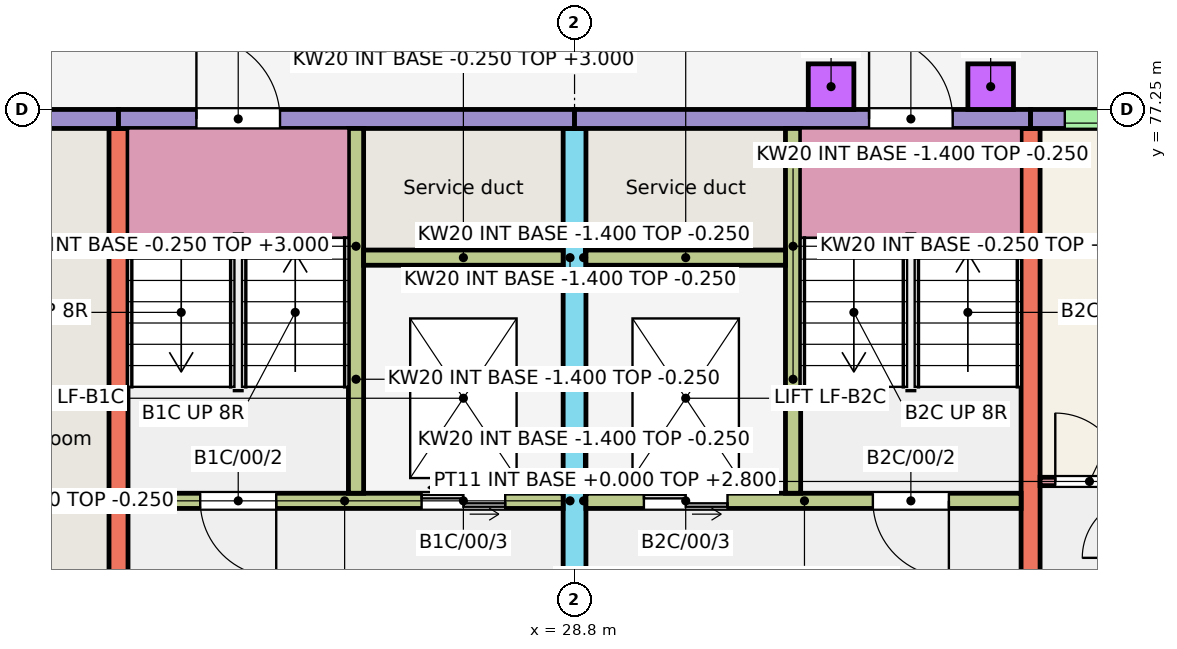
"""IFC4 building model, lengths in metres.
Left out: names, types, materials, properties, quantities, classifications, styles, units other than length and angle.
Written with IfcOpenShell. Run it as: python <this file> out.ifc"""

import sys

from ifc_helpers import new_model, si_unit, direction, frame, frame_2d, origin, origin_2d, place, context, subcontext, project, spatial, rectangle, extrude, element, fill, save


model = new_model("IFC4")
c1 = context("Model", 3, precision=1e-05, world=origin(), true_north=direction((0.0, 1.0)))
c2 = subcontext(c1, "Body", "Model", "MODEL_VIEW")
j1 = project(units=[si_unit("LENGTHUNIT", "METRE"), si_unit("PLANEANGLEUNIT", "RADIAN")], contexts=[c1])
p1 = place(None, origin())
s1 = spatial("IfcSite", under=j1, at=p1, CompositionType="ELEMENT")
p2 = place(p1, origin())
s2 = spatial("IfcBuilding", under=s1, at=p2, CompositionType="ELEMENT")
p3 = place(p2, origin())
s3 = spatial("IfcBuildingStorey", under=s2, at=p3, CompositionType="ELEMENT", Elevation=0.0)
p4 = place(p3, frame((22.8, 68.0, -0.25), z_axis=(0.0, 0.0, 1.0), x_axis=(0.0, 1.0, 0.0)))
e1 = element("IfcWall", 1, at=p4, inside=s3, PredefinedType="SHEAR", context=c2, shape_type="SweptSolid", body=[
    extrude(rectangle(XDim=9.0, YDim=0.25, at=frame_2d((4.5, 0.0))), origin(), (0.0, 0.0, 1.0), 3.25),
])
p5 = place(p3, frame((28.8, 66.0, -0.25), z_axis=(0.0, 0.0, 1.0), x_axis=(0.0, 1.0, 0.0)))
e2 = element("IfcWall", 2, at=p5, inside=s3, PredefinedType="SHEAR", context=c2, shape_type="SweptSolid", body=[
    extrude(rectangle(XDim=11.0, YDim=0.3, at=frame_2d((5.5, 0.0))), origin(), (0.0, 0.0, 1.0), 3.25),
])
p6 = place(p5, frame((0.3, 0.0, 0.25)))
e3 = element("IfcOpeningElement", 3, at=p6, cuts=e2, PredefinedType="OPENING", context=c2, shape_type="SweptSolid", body=[
    extrude(rectangle(XDim=1.2, YDim=2.1, at=frame_2d((0.6, 1.05))), frame((0.0, 0.16, 0.0), z_axis=(0.0, -1.0, 0.0), x_axis=(1.0, 0.0, 0.0)), (0.0, 0.0, 1.0), 0.32),
])
p7 = place(p3, frame((34.8, 68.0, -0.25), z_axis=(0.0, 0.0, 1.0), x_axis=(0.0, 1.0, 0.0)))
e4 = element("IfcWall", 4, at=p7, inside=s3, PredefinedType="SHEAR", context=c2, shape_type="SweptSolid", body=[
    extrude(rectangle(XDim=9.0, YDim=0.25, at=frame_2d((4.5, 0.0))), origin(), (0.0, 0.0, 1.0), 3.25),
])
p8 = place(p3, frame((19.2, 77.125, -0.25), z_axis=(0.0, 0.0, 1.0), x_axis=(1.0, 0.0, 0.0)))
e5 = element("IfcWall", 5, at=p8, inside=s3, PredefinedType="SOLIDWALL", context=c2, shape_type="SweptSolid", body=[
    extrude(rectangle(XDim=3.6, YDim=0.25, at=frame_2d((1.8, 0.0))), origin(), (0.0, 0.0, 1.0), 3.25),
])
p9 = place(p8, frame((1.288, 0.0, 0.25)))
e6 = element("IfcOpeningElement", 6, at=p9, cuts=e5, PredefinedType="OPENING", context=c2, shape_type="SweptSolid", body=[
    extrude(rectangle(XDim=1.0, YDim=2.1, at=frame_2d((0.5, 1.05))), frame((0.0, 0.135, 0.0), z_axis=(0.0, -1.0, 0.0), x_axis=(1.0, 0.0, 0.0)), (0.0, 0.0, 1.0), 0.27),
])
p10 = place(p3, frame((22.8, 77.125, -0.25), z_axis=(0.0, 0.0, 1.0), x_axis=(1.0, 0.0, 0.0)))
e7 = element("IfcWall", 7, at=p10, inside=s3, PredefinedType="SOLIDWALL", context=c2, shape_type="SweptSolid", body=[
    extrude(rectangle(XDim=6.0, YDim=0.25, at=frame_2d((3.0, 0.0))), origin(), (0.0, 0.0, 1.0), 3.25),
])
p11 = place(p10, frame((1.025, 0.0, 0.25)))
e8 = element("IfcOpeningElement", 8, at=p11, cuts=e7, PredefinedType="OPENING", context=c2, shape_type="SweptSolid", body=[
    extrude(rectangle(XDim=1.1, YDim=2.1, at=frame_2d((0.55, 1.05))), frame((0.0, 0.135, 0.0), z_axis=(0.0, -1.0, 0.0), x_axis=(1.0, 0.0, 0.0)), (0.0, 0.0, 1.0), 0.27),
])
p12 = place(p3, frame((22.925, 72.1, -0.25), z_axis=(0.0, 0.0, 1.0), x_axis=(1.0, 0.0, 0.0)))
e9 = element("IfcWall", 9, at=p12, inside=s3, PredefinedType="SHEAR", context=c2, shape_type="SweptSolid", body=[
    extrude(rectangle(XDim=5.725, YDim=0.2, at=frame_2d((2.862, 0.0))), origin(), (0.0, 0.0, 1.0), 3.25),
])
p13 = place(p12, frame((0.95, 0.0, 0.25)))
e10 = element("IfcOpeningElement", 10, at=p13, cuts=e9, PredefinedType="OPENING", context=c2, shape_type="SweptSolid", body=[
    extrude(rectangle(XDim=1.0, YDim=2.1, at=frame_2d((0.5, 1.05))), frame((0.0, 0.11, 0.0), z_axis=(0.0, -1.0, 0.0), x_axis=(1.0, 0.0, 0.0)), (0.0, 0.0, 1.0), 0.22),
])
p14 = place(p12, frame((3.863, 0.0, 0.25)))
e11 = element("IfcOpeningElement", 11, at=p14, cuts=e9, PredefinedType="OPENING", context=c2, shape_type="SweptSolid", body=[
    extrude(rectangle(XDim=1.1, YDim=2.1, at=frame_2d((0.55, 1.05))), frame((0.0, 0.11, 0.0), z_axis=(0.0, -1.0, 0.0), x_axis=(1.0, 0.0, 0.0)), (0.0, 0.0, 1.0), 0.22),
])
p15 = place(p3, frame((25.925, 72.2, -0.25), z_axis=(0.0, 0.0, 1.0), x_axis=(0.0, 1.0, 0.0)))
e12 = element("IfcWall", 12, at=p15, inside=s3, PredefinedType="SHEAR", context=c2, shape_type="SweptSolid", body=[
    extrude(rectangle(XDim=4.8, YDim=0.2, at=frame_2d((2.4, 0.0))), origin(), (0.0, 0.0, 1.0), 3.25),
])
p16 = place(p3, frame((26.025, 75.3, -0.25), z_axis=(0.0, 0.0, 1.0), x_axis=(1.0, 0.0, 0.0)))
e13 = element("IfcWall", 13, at=p16, inside=s3, PredefinedType="SHEAR", context=c2, shape_type="SweptSolid", body=[
    extrude(rectangle(XDim=2.625, YDim=0.2, at=frame_2d((1.312, 0.0))), origin(), (0.0, 0.0, 1.0), 3.25),
])
p17 = place(p3, frame((28.8, 77.125, -0.25), z_axis=(0.0, 0.0, 1.0), x_axis=(1.0, 0.0, 0.0)))
e14 = element("IfcWall", 14, at=p17, inside=s3, PredefinedType="SOLIDWALL", context=c2, shape_type="SweptSolid", body=[
    extrude(rectangle(XDim=6.0, YDim=0.25, at=frame_2d((3.0, 0.0))), origin(), (0.0, 0.0, 1.0), 3.25),
])
p18 = place(p17, frame((3.875, 0.0, 0.25)))
e15 = element("IfcOpeningElement", 15, at=p18, cuts=e14, PredefinedType="OPENING", context=c2, shape_type="SweptSolid", body=[
    extrude(rectangle(XDim=1.1, YDim=2.1, at=frame_2d((0.55, 1.05))), frame((0.0, 0.135, 0.0), z_axis=(0.0, -1.0, 0.0), x_axis=(1.0, 0.0, 0.0)), (0.0, 0.0, 1.0), 0.27),
])
p19 = place(p3, frame((28.95, 72.1, -0.25), z_axis=(0.0, 0.0, 1.0), x_axis=(1.0, 0.0, 0.0)))
e16 = element("IfcWall", 16, at=p19, inside=s3, PredefinedType="SHEAR", context=c2, shape_type="SweptSolid", body=[
    extrude(rectangle(XDim=5.725, YDim=0.2, at=frame_2d((2.863, 0.0))), origin(), (0.0, 0.0, 1.0), 3.25),
])
p20 = place(p19, frame((3.775, 0.0, 0.25)))
e17 = element("IfcOpeningElement", 17, at=p20, cuts=e16, PredefinedType="OPENING", context=c2, shape_type="SweptSolid", body=[
    extrude(rectangle(XDim=1.0, YDim=2.1, at=frame_2d((0.5, 1.05))), frame((0.0, 0.11, 0.0), z_axis=(0.0, -1.0, 0.0), x_axis=(1.0, 0.0, 0.0)), (0.0, 0.0, 1.0), 0.22),
])
p21 = place(p19, frame((0.762, 0.0, 0.25)))
e18 = element("IfcOpeningElement", 18, at=p21, cuts=e16, PredefinedType="OPENING", context=c2, shape_type="SweptSolid", body=[
    extrude(rectangle(XDim=1.1, YDim=2.1, at=frame_2d((0.55, 1.05))), frame((0.0, 0.11, 0.0), z_axis=(0.0, -1.0, 0.0), x_axis=(1.0, 0.0, 0.0)), (0.0, 0.0, 1.0), 0.22),
])
p22 = place(p3, frame((31.675, 72.2, -0.25), z_axis=(0.0, 0.0, 1.0), x_axis=(0.0, 1.0, 0.0)))
e19 = element("IfcWall", 19, at=p22, inside=s3, PredefinedType="SHEAR", context=c2, shape_type="SweptSolid", body=[
    extrude(rectangle(XDim=4.8, YDim=0.2, at=frame_2d((2.4, 0.0))), origin(), (0.0, 0.0, 1.0), 3.25),
])
p23 = place(p3, frame((28.95, 75.3, -0.25), z_axis=(0.0, 0.0, 1.0), x_axis=(1.0, 0.0, 0.0)))
e20 = element("IfcWall", 20, at=p23, inside=s3, PredefinedType="SHEAR", context=c2, shape_type="SweptSolid", body=[
    extrude(rectangle(XDim=2.625, YDim=0.2, at=frame_2d((1.312, 0.0))), origin(), (0.0, 0.0, 1.0), 3.25),
])
p24 = place(p3, frame((34.8, 77.125, -0.25), z_axis=(0.0, 0.0, 1.0), x_axis=(1.0, 0.0, 0.0)))
e21 = element("IfcWall", 21, at=p24, inside=s3, PredefinedType="SOLIDWALL", context=c2, shape_type="SweptSolid", body=[
    extrude(rectangle(XDim=3.6, YDim=0.25, at=frame_2d((1.8, 0.0))), origin(), (0.0, 0.0, 1.0), 3.25),
])
p25 = place(p24, frame((0.45, 0.0, 1.45)))
e22 = element("IfcOpeningElement", 22, at=p25, cuts=e21, PredefinedType="OPENING", context=c2, shape_type="SweptSolid", body=[
    extrude(rectangle(XDim=1.5, YDim=1.2, at=frame_2d((0.75, 0.6))), frame((0.0, 0.135, 0.0), z_axis=(0.0, -1.0, 0.0), x_axis=(1.0, 0.0, 0.0)), (0.0, 0.0, 1.0), 0.27),
])
p26 = place(p24, frame((2.375, 0.0, 0.25)))
e23 = element("IfcOpeningElement", 23, at=p26, cuts=e21, PredefinedType="OPENING", context=c2, shape_type="SweptSolid", body=[
    extrude(rectangle(XDim=1.0, YDim=2.1, at=frame_2d((0.5, 1.05))), frame((0.0, 0.135, 0.0), z_axis=(0.0, -1.0, 0.0), x_axis=(1.0, 0.0, 0.0)), (0.0, 0.0, 1.0), 0.27),
])
for number, where, z_axis, x_axis in (
    (24, (25.825, 72.1, -1.4), (0.0, 0.0, 1.0), (1.0, 0.0, 0.0)),
    (25, (25.825, 75.3, -1.4), (0.0, 0.0, 1.0), (1.0, 0.0, 0.0)),
):
    element("IfcWall", number, at=place(p3, frame(where, z_axis=z_axis, x_axis=x_axis)), inside=s3, PredefinedType="SHEAR", context=c2, shape_type="SweptSolid", body=[
        extrude(rectangle(XDim=2.975, YDim=0.2, at=frame_2d((1.488, 0.0))), origin(), (0.0, 0.0, 1.0), 1.15),
    ])
p27 = place(p3, frame((25.925, 72.2, -1.4), z_axis=(0.0, 0.0, 1.0), x_axis=(0.0, 1.0, 0.0)))
e26 = element("IfcWall", 26, at=p27, inside=s3, PredefinedType="SHEAR", context=c2, shape_type="SweptSolid", body=[
    extrude(rectangle(XDim=3.0, YDim=0.2, at=frame_2d((1.5, 0.0))), origin(), (0.0, 0.0, 1.0), 1.15),
])
p28 = place(p3, frame((28.725, 72.2, -1.4), z_axis=(0.0, 0.0, 1.0), x_axis=(0.0, 1.0, 0.0)))
e27 = element("IfcWall", 27, at=p28, inside=s3, PredefinedType="SHEAR", context=c2, shape_type="SweptSolid", body=[
    extrude(rectangle(XDim=3.0, YDim=0.15, at=frame_2d((1.5, 0.0))), origin(), (0.0, 0.0, 1.0), 1.15),
])
for number, where, z_axis, x_axis in (
    (28, (28.8, 72.1, -1.4), (0.0, 0.0, 1.0), (1.0, 0.0, 0.0)),
    (29, (28.8, 75.3, -1.4), (0.0, 0.0, 1.0), (1.0, 0.0, 0.0)),
):
    element("IfcWall", number, at=place(p3, frame(where, z_axis=z_axis, x_axis=x_axis)), inside=s3, PredefinedType="SHEAR", context=c2, shape_type="SweptSolid", body=[
        extrude(rectangle(XDim=2.975, YDim=0.2, at=frame_2d((1.487, 0.0))), origin(), (0.0, 0.0, 1.0), 1.15),
    ])
p29 = place(p3, frame((31.675, 72.2, -1.4), z_axis=(0.0, 0.0, 1.0), x_axis=(0.0, 1.0, 0.0)))
e30 = element("IfcWall", 30, at=p29, inside=s3, PredefinedType="SHEAR", context=c2, shape_type="SweptSolid", body=[
    extrude(rectangle(XDim=3.0, YDim=0.2, at=frame_2d((1.5, 0.0))), origin(), (0.0, 0.0, 1.0), 1.15),
])
p30 = place(p3, frame((28.875, 72.2, -1.4), z_axis=(0.0, 0.0, 1.0), x_axis=(0.0, 1.0, 0.0)))
e31 = element("IfcWall", 31, at=p30, inside=s3, PredefinedType="SHEAR", context=c2, shape_type="SweptSolid", body=[
    extrude(rectangle(XDim=3.0, YDim=0.15, at=frame_2d((1.5, 0.0))), origin(), (0.0, 0.0, 1.0), 1.15),
])
for number, where, z_axis, x_axis in (
    (32, (32.175, 77.55, -0.25), (0.0, 0.0, 1.0), (1.0, 0.0, 0.0)),
    (33, (34.275, 77.55, -0.25), (0.0, 0.0, 1.0), (1.0, 0.0, 0.0)),
):
    element("IfcColumn", number, at=place(p3, frame(where, z_axis=z_axis, x_axis=x_axis)), inside=s3, PredefinedType="COLUMN", context=c2, shape_type="SweptSolid", body=[
        extrude(rectangle(XDim=0.6, YDim=0.6, at=origin_2d()), origin(), (0.0, 0.0, 1.0), 3.15),
    ])
p31 = place(p3, frame((34.925, 72.355, 0.0), z_axis=(0.0, 0.0, 1.0), x_axis=(1.0, 0.0, 0.0)))
e34 = element("IfcWall", 34, at=p31, inside=s3, PredefinedType="PARTITIONING", context=c2, shape_type="SweptSolid", body=[
    extrude(rectangle(XDim=3.35, YDim=0.11, at=frame_2d((1.675, 0.0))), origin(), (0.0, 0.0, 1.0), 2.8),
])
p32 = place(p31, frame((0.2, 0.0, 0.0)))
e35 = element("IfcOpeningElement", 35, at=p32, cuts=e34, PredefinedType="OPENING", context=c2, shape_type="SweptSolid", body=[
    extrude(rectangle(XDim=0.9, YDim=2.1, at=frame_2d((0.45, 1.05))), frame((0.0, 0.065, 0.0), z_axis=(0.0, -1.0, 0.0), x_axis=(1.0, 0.0, 0.0)), (0.0, 0.0, 1.0), 0.13),
])
p33 = place(p25, origin())
e36 = element("IfcWindow", 36, at=p33, inside=s3, PartitioningType="SINGLE_PANEL", PredefinedType="WINDOW", context=c2, shape_type="SweptSolid", body=[
    extrude(rectangle(XDim=1.5, YDim=1.2, at=frame_2d((0.75, 0.6))), frame((0.0, -0.025, 0.0), z_axis=(0.0, -1.0, 0.0), x_axis=(1.0, 0.0, 0.0)), (0.0, 0.0, 1.0), 0.06),
])
fill(e22, e36)
p34 = place(p32, origin())
e37 = element("IfcDoor", 37, at=p34, inside=s3, OperationType="SINGLE_SWING_LEFT", PredefinedType="DOOR", context=c2, shape_type="SweptSolid", body=[
    extrude(rectangle(XDim=0.9, YDim=2.1, at=frame_2d((0.45, 1.05))), frame((0.0, 0.025, 0.0), z_axis=(0.0, -1.0, 0.0), x_axis=(1.0, 0.0, 0.0)), (0.0, 0.0, 1.0), 0.05),
])
fill(e35, e37)
p35 = place(p13, origin())
e38 = element("IfcDoor", 38, at=p35, inside=s3, OperationType="SINGLE_SWING_RIGHT", PredefinedType="DOOR", context=c2, shape_type="SweptSolid", body=[
    extrude(rectangle(XDim=1.0, YDim=2.1, at=frame_2d((0.5, 1.05))), frame((0.0, 0.025, 0.0), z_axis=(0.0, -1.0, 0.0), x_axis=(1.0, 0.0, 0.0)), (0.0, 0.0, 1.0), 0.05),
])
fill(e10, e38)
p36 = place(p14, origin())
e39 = element("IfcDoor", 39, at=p36, inside=s3, OperationType="DOUBLE_DOOR_SLIDING", PredefinedType="DOOR", context=c2, shape_type="SweptSolid", body=[
    extrude(rectangle(XDim=1.1, YDim=2.1, at=frame_2d((0.55, 1.05))), frame((0.0, 0.025, 0.0), z_axis=(0.0, -1.0, 0.0), x_axis=(1.0, 0.0, 0.0)), (0.0, 0.0, 1.0), 0.05),
])
fill(e11, e39)
p37 = place(p11, origin())
e40 = element("IfcDoor", 40, at=p37, inside=s3, OperationType="SINGLE_SWING_LEFT", PredefinedType="DOOR", context=c2, shape_type="SweptSolid", body=[
    extrude(rectangle(XDim=1.1, YDim=2.1, at=frame_2d((0.55, 1.05))), frame((0.0, 0.025, 0.0), z_axis=(0.0, -1.0, 0.0), x_axis=(1.0, 0.0, 0.0)), (0.0, 0.0, 1.0), 0.05),
])
fill(e8, e40)
p38 = place(p20, origin())
e41 = element("IfcDoor", 41, at=p38, inside=s3, OperationType="SINGLE_SWING_RIGHT", PredefinedType="DOOR", context=c2, shape_type="SweptSolid", body=[
    extrude(rectangle(XDim=1.0, YDim=2.1, at=frame_2d((0.5, 1.05))), frame((0.0, 0.025, 0.0), z_axis=(0.0, -1.0, 0.0), x_axis=(1.0, 0.0, 0.0)), (0.0, 0.0, 1.0), 0.05),
])
fill(e17, e41)
p39 = place(p21, origin())
e42 = element("IfcDoor", 42, at=p39, inside=s3, OperationType="DOUBLE_DOOR_SLIDING", PredefinedType="DOOR", context=c2, shape_type="SweptSolid", body=[
    extrude(rectangle(XDim=1.1, YDim=2.1, at=frame_2d((0.55, 1.05))), frame((0.0, 0.025, 0.0), z_axis=(0.0, -1.0, 0.0), x_axis=(1.0, 0.0, 0.0)), (0.0, 0.0, 1.0), 0.05),
])
fill(e18, e42)
p40 = place(p18, origin())
e43 = element("IfcDoor", 43, at=p40, inside=s3, OperationType="SINGLE_SWING_LEFT", PredefinedType="DOOR", context=c2, shape_type="SweptSolid", body=[
    extrude(rectangle(XDim=1.1, YDim=2.1, at=frame_2d((0.55, 1.05))), frame((0.0, 0.025, 0.0), z_axis=(0.0, -1.0, 0.0), x_axis=(1.0, 0.0, 0.0)), (0.0, 0.0, 1.0), 0.05),
])
fill(e15, e43)
save(model, sys.argv[1])
